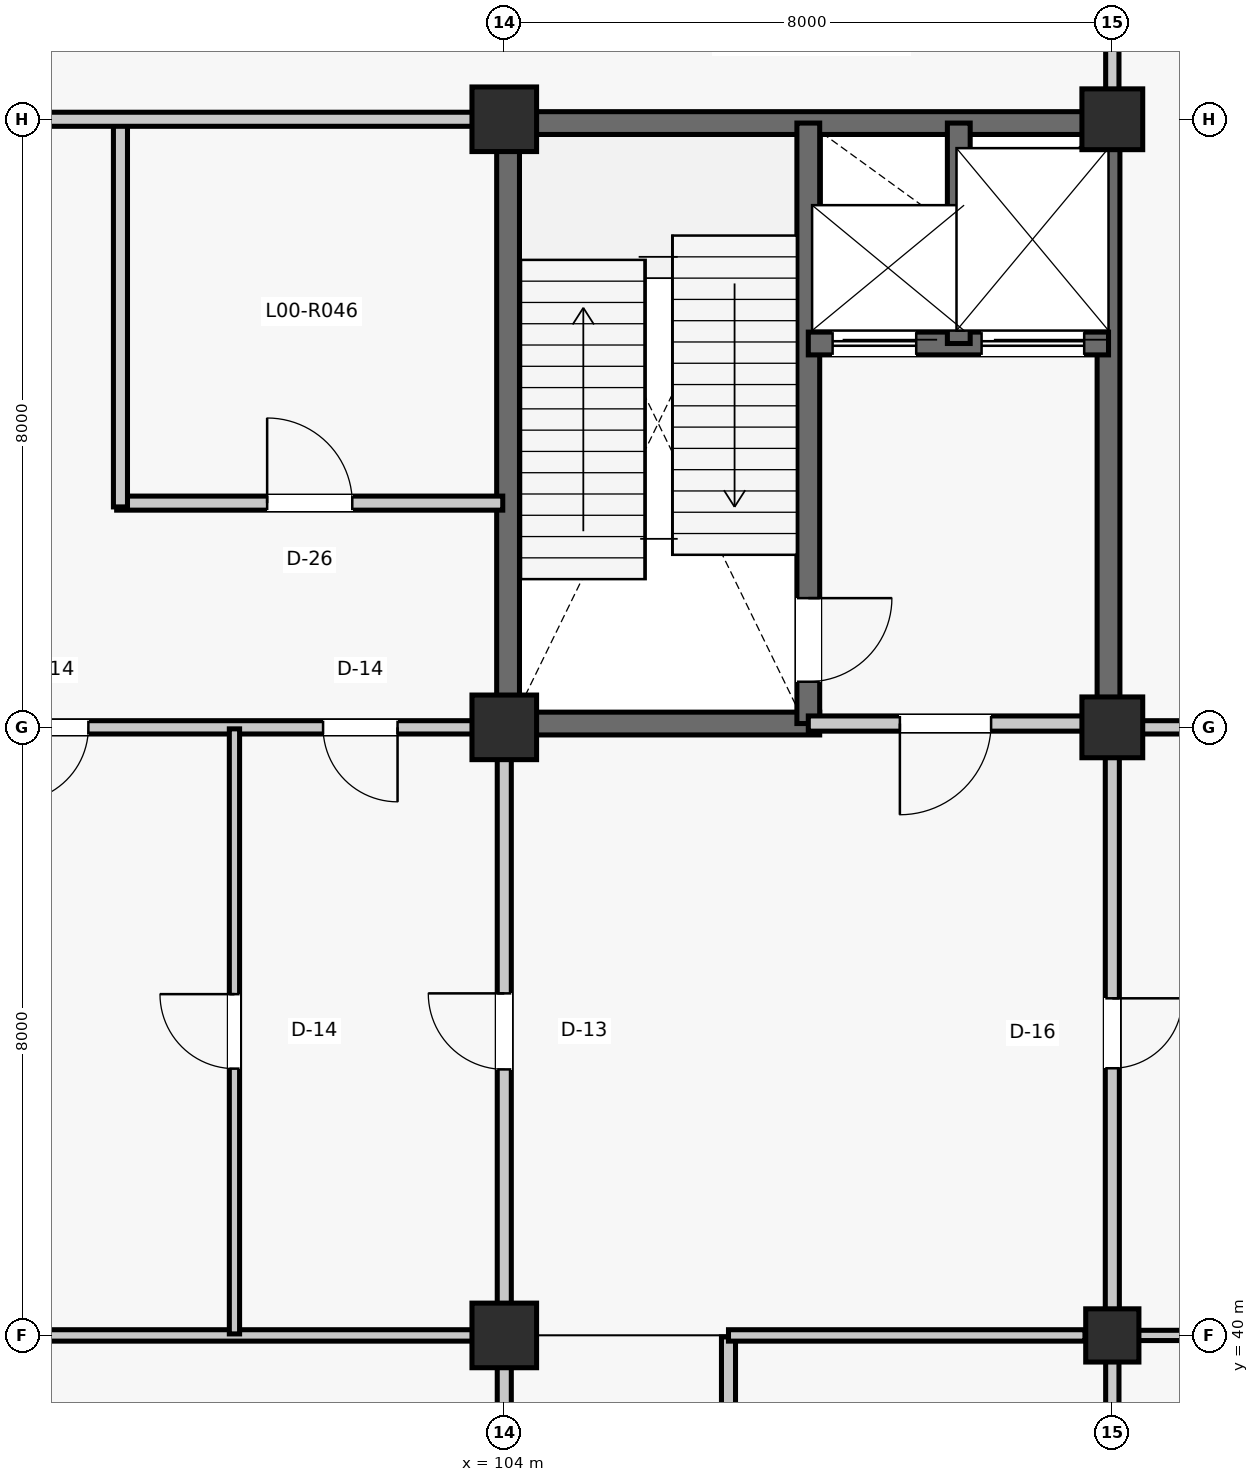
"""IFC4 building model, lengths in metres.
Left out: names, types, materials, properties, quantities, classifications, styles, units other than length and angle.
Written with IfcOpenShell. Run it as: python <this file> out.ifc"""

import sys

from ifc_helpers import new_model, si_unit, direction, frame, frame_2d, origin, origin_2d, place, context, subcontext, project, spatial, rectangle, extrude, element, fill, save


model = new_model("IFC4")
c1 = context("Model", 3, precision=1e-05, world=origin(), true_north=direction((0.0, 1.0)))
c2 = subcontext(c1, "Body", "Model", "MODEL_VIEW")
j1 = project(units=[si_unit("LENGTHUNIT", "METRE"), si_unit("PLANEANGLEUNIT", "RADIAN")], contexts=[c1])
p1 = place(None, origin())
s1 = spatial("IfcSite", under=j1, at=p1, CompositionType="ELEMENT")
p2 = place(p1, origin())
s2 = spatial("IfcBuilding", under=s1, at=p2, CompositionType="ELEMENT")
p3 = place(p2, origin())
s3 = spatial("IfcBuildingStorey", under=s2, at=p3, CompositionType="ELEMENT", Elevation=0.0)
for number, where, z_axis, x_axis in (
    (1, (104.0, 40.0, 0.0), (0.0, 0.0, 1.0), (1.0, 0.0, 0.0)),
    (2, (104.0, 48.0, 0.0), (0.0, 0.0, 1.0), (1.0, 0.0, 0.0)),
    (3, (104.0, 56.0, 0.0), (0.0, 0.0, 1.0), (1.0, 0.0, 0.0)),
):
    element("IfcColumn", number, at=place(p3, frame(where, z_axis=z_axis, x_axis=x_axis)), inside=s3, PredefinedType="COLUMN", context=c2, shape_type="SweptSolid", body=[
        extrude(rectangle(XDim=0.85, YDim=0.85, at=origin_2d()), origin(), (0.0, 0.0, 1.0), 5.28),
    ])
p4 = place(p3, frame((112.0, 40.0, 0.0), z_axis=(0.0, 0.0, 1.0), x_axis=(1.0, 0.0, 0.0)))
e4 = element("IfcColumn", 4, at=p4, inside=s3, PredefinedType="COLUMN", context=c2, shape_type="SweptSolid", body=[
    extrude(rectangle(XDim=0.7, YDim=0.7, at=origin_2d()), origin(), (0.0, 0.0, 1.0), 5.28),
])
for number, where, z_axis, x_axis in (
    (5, (112.0, 48.0, 0.0), (0.0, 0.0, 1.0), (1.0, 0.0, 0.0)),
    (6, (112.0, 56.0, 0.0), (0.0, 0.0, 1.0), (1.0, 0.0, 0.0)),
):
    element("IfcColumn", number, at=place(p3, frame(where, z_axis=z_axis, x_axis=x_axis)), inside=s3, PredefinedType="COLUMN", context=c2, shape_type="SweptSolid", body=[
        extrude(rectangle(XDim=0.8, YDim=0.8, at=origin_2d()), origin(), (0.0, 0.0, 1.0), 5.28),
    ])
p5 = place(p3, frame((104.05, 48.315, 0.0), z_axis=(0.0, 0.0, 1.0), x_axis=(0.0, 1.0, 0.0)))
e7 = element("IfcWall", 7, at=p5, inside=s3, PredefinedType="SHEAR", context=c2, shape_type="SweptSolid", body=[
    extrude(rectangle(XDim=7.37, YDim=0.3, at=frame_2d((3.685, 0.0))), origin(), (0.0, 0.0, 1.0), 5.035),
])
p6 = place(p3, frame((104.315, 55.95, 0.0), z_axis=(0.0, 0.0, 1.0), x_axis=(1.0, 0.0, 0.0)))
e8 = element("IfcWall", 8, at=p6, inside=s3, PredefinedType="SHEAR", context=c2, shape_type="SweptSolid", body=[
    extrude(rectangle(XDim=7.395, YDim=0.3, at=frame_2d((3.698, 0.0))), origin(), (0.0, 0.0, 1.0), 5.035),
])
p7 = place(p3, frame((111.95, 48.29, 0.0), z_axis=(0.0, 0.0, 1.0), x_axis=(0.0, 1.0, 0.0)))
e9 = element("IfcWall", 9, at=p7, inside=s3, PredefinedType="SHEAR", context=c2, shape_type="SweptSolid", body=[
    extrude(rectangle(XDim=7.42, YDim=0.3, at=frame_2d((3.71, 0.0))), origin(), (0.0, 0.0, 1.0), 5.035),
])
p8 = place(p3, frame((104.315, 48.05, 0.0), z_axis=(0.0, 0.0, 1.0), x_axis=(1.0, 0.0, 0.0)))
e10 = element("IfcWall", 10, at=p8, inside=s3, PredefinedType="SHEAR", context=c2, shape_type="SweptSolid", body=[
    extrude(rectangle(XDim=3.835, YDim=0.3, at=frame_2d((1.917, 0.0))), origin(), (0.0, 0.0, 1.0), 5.035),
])
p9 = place(p3, frame((108.0, 48.05, 0.0), z_axis=(0.0, 0.0, 1.0), x_axis=(0.0, 1.0, 0.0)))
e11 = element("IfcWall", 11, at=p9, inside=s3, PredefinedType="SHEAR", context=c2, shape_type="SweptSolid", body=[
    extrude(rectangle(XDim=7.9, YDim=0.3, at=frame_2d((3.95, 0.0))), origin(), (0.0, 0.0, 1.0), 5.035),
])
p10 = place(p9, frame((0.55, 0.0, 0.0)))
e12 = element("IfcOpeningElement", 12, at=p10, cuts=e11, PredefinedType="OPENING", context=c2, shape_type="SweptSolid", body=[
    extrude(rectangle(XDim=1.1, YDim=2.15, at=frame_2d((0.55, 1.075))), frame((0.0, 0.16, 0.0), z_axis=(0.0, -1.0, 0.0), x_axis=(1.0, 0.0, 0.0)), (0.0, 0.0, 1.0), 0.32),
])
p11 = place(p3, frame((108.0, 53.05, 0.0), z_axis=(0.0, 0.0, 1.0), x_axis=(1.0, 0.0, 0.0)))
e13 = element("IfcWall", 13, at=p11, inside=s3, PredefinedType="SHEAR", context=c2, shape_type="SweptSolid", body=[
    extrude(rectangle(XDim=3.95, YDim=0.3, at=frame_2d((1.975, 0.0))), origin(), (0.0, 0.0, 1.0), 5.035),
])
p12 = place(p11, frame((0.32, 0.0, 0.0)))
e14 = element("IfcOpeningElement", 14, at=p12, cuts=e13, PredefinedType="OPENING", context=c2, shape_type="SweptSolid", body=[
    extrude(rectangle(XDim=1.1, YDim=2.2, at=frame_2d((0.55, 1.1))), frame((0.0, 0.16, 0.0), z_axis=(0.0, -1.0, 0.0), x_axis=(1.0, 0.0, 0.0)), (0.0, 0.0, 1.0), 0.32),
])
p13 = place(p11, frame((2.28, 0.0, 0.0)))
e15 = element("IfcOpeningElement", 15, at=p13, cuts=e13, PredefinedType="OPENING", context=c2, shape_type="SweptSolid", body=[
    extrude(rectangle(XDim=1.35, YDim=2.3, at=frame_2d((0.675, 1.15))), frame((0.0, 0.16, 0.0), z_axis=(0.0, -1.0, 0.0), x_axis=(1.0, 0.0, 0.0)), (0.0, 0.0, 1.0), 0.32),
])
p14 = place(p3, frame((109.98, 53.05, 0.0), z_axis=(0.0, 0.0, 1.0), x_axis=(0.0, 1.0, 0.0)))
e16 = element("IfcWall", 16, at=p14, inside=s3, PredefinedType="SHEAR", context=c2, shape_type="SweptSolid", body=[
    extrude(rectangle(XDim=2.9, YDim=0.3, at=frame_2d((1.45, 0.0))), origin(), (0.0, 0.0, 1.0), 5.035),
])
p15 = place(p3, frame((108.0, 48.05, 0.0), z_axis=(0.0, 0.0, 1.0), x_axis=(1.0, 0.0, 0.0)))
e17 = element("IfcWall", 17, at=p15, inside=s3, PredefinedType="PARTITIONING", context=c2, shape_type="SweptSolid", body=[
    extrude(rectangle(XDim=3.61, YDim=0.2, at=frame_2d((1.805, 0.0))), origin(), (0.0, 0.0, 1.0), 4.404),
])
p16 = place(p15, frame((1.205, 0.0, 0.0)))
e18 = element("IfcOpeningElement", 18, at=p16, cuts=e17, PredefinedType="OPENING", context=c2, shape_type="SweptSolid", body=[
    extrude(rectangle(XDim=1.2, YDim=2.15, at=frame_2d((0.6, 1.075))), frame((0.0, 0.11, 0.0), z_axis=(0.0, -1.0, 0.0), x_axis=(1.0, 0.0, 0.0)), (0.0, 0.0, 1.0), 0.22),
])
p17 = place(p3, frame((98.9, 50.95, 0.0), z_axis=(0.0, 0.0, 1.0), x_axis=(1.0, 0.0, 0.0)))
e19 = element("IfcWall", 19, at=p17, inside=s3, PredefinedType="PARTITIONING", context=c2, shape_type="SweptSolid", body=[
    extrude(rectangle(XDim=5.08, YDim=0.185, at=frame_2d((2.54, 0.0))), origin(), (0.0, 0.0, 1.0), 4.471),
])
p18 = place(p17, frame((1.98, 0.0, 0.0)))
e20 = element("IfcOpeningElement", 20, at=p18, cuts=e19, PredefinedType="OPENING", context=c2, shape_type="SweptSolid", body=[
    extrude(rectangle(XDim=1.12, YDim=2.22, at=frame_2d((0.56, 1.11))), frame((0.0, 0.103, 0.0), z_axis=(0.0, -1.0, 0.0), x_axis=(1.0, 0.0, 0.0)), (0.0, 0.0, 1.0), 0.205),
])
p19 = place(p3, frame((98.95, 50.9, 0.0), z_axis=(0.0, 0.0, 1.0), x_axis=(0.0, 1.0, 0.0)))
e21 = element("IfcWall", 21, at=p19, inside=s3, PredefinedType="PARTITIONING", context=c2, shape_type="SweptSolid", body=[
    extrude(rectangle(XDim=5.08, YDim=0.185, at=frame_2d((2.54, 0.0))), origin(), (0.0, 0.0, 1.0), 4.404),
])
p20 = place(p3, frame((106.95, 34.9, 0.0), z_axis=(0.0, 0.0, 1.0), x_axis=(0.0, 1.0, 0.0)))
e22 = element("IfcWall", 22, at=p20, inside=s3, PredefinedType="PARTITIONING", context=c2, shape_type="SweptSolid", body=[
    extrude(rectangle(XDim=5.08, YDim=0.185, at=frame_2d((2.54, 0.0))), origin(), (0.0, 0.0, 1.0), 4.336),
])
p21 = place(p3, frame((106.95, 40.0, 0.0), z_axis=(0.0, 0.0, 1.0), x_axis=(1.0, 0.0, 0.0)))
e23 = element("IfcWall", 23, at=p21, inside=s3, PredefinedType="PARTITIONING", context=c2, shape_type="SweptSolid", body=[
    extrude(rectangle(XDim=4.69, YDim=0.15, at=frame_2d((2.345, 0.0))), origin(), (0.0, 0.0, 1.0), 4.336),
])
p22 = place(p3, frame((104.0, 32.415, 0.0), z_axis=(0.0, 0.0, 1.0), x_axis=(0.0, 1.0, 0.0)))
e24 = element("IfcWall", 24, at=p22, inside=s3, PredefinedType="PARTITIONING", context=c2, shape_type="SweptSolid", body=[
    extrude(rectangle(XDim=7.17, YDim=0.185, at=frame_2d((3.585, 0.0))), origin(), (0.0, 0.0, 1.0), 4.412),
])
p23 = place(p22, frame((2.935, 0.0, 0.0)))
e25 = element("IfcOpeningElement", 25, at=p23, cuts=e24, PredefinedType="OPENING", context=c2, shape_type="SweptSolid", body=[
    extrude(rectangle(XDim=1.3, YDim=2.2, at=frame_2d((0.65, 1.1))), frame((0.0, 0.103, 0.0), z_axis=(0.0, -1.0, 0.0), x_axis=(1.0, 0.0, 0.0)), (0.0, 0.0, 1.0), 0.205),
])
p24 = place(p3, frame((96.189, 40.0, 0.0), z_axis=(0.0, 0.0, 1.0), x_axis=(1.0, 0.0, 0.0)))
e26 = element("IfcWall", 26, at=p24, inside=s3, PredefinedType="PARTITIONING", context=c2, shape_type="SweptSolid", body=[
    extrude(rectangle(XDim=7.396, YDim=0.15, at=frame_2d((3.698, 0.0))), origin(), (0.0, 0.0, 1.0), 4.403),
])
p25 = place(p3, frame((104.0, 40.415, 0.0), z_axis=(0.0, 0.0, 1.0), x_axis=(0.0, 1.0, 0.0)))
e27 = element("IfcWall", 27, at=p25, inside=s3, PredefinedType="PARTITIONING", context=c2, shape_type="SweptSolid", body=[
    extrude(rectangle(XDim=7.17, YDim=0.185, at=frame_2d((3.585, 0.0))), origin(), (0.0, 0.0, 1.0), 4.404),
])
p26 = place(p25, frame((3.085, 0.0, 0.0)))
e28 = element("IfcOpeningElement", 28, at=p26, cuts=e27, PredefinedType="OPENING", context=c2, shape_type="SweptSolid", body=[
    extrude(rectangle(XDim=1.0, YDim=2.15, at=frame_2d((0.5, 1.075))), frame((0.0, 0.103, 0.0), z_axis=(0.0, -1.0, 0.0), x_axis=(1.0, 0.0, 0.0)), (0.0, 0.0, 1.0), 0.205),
])
p27 = place(p3, frame((96.189, 48.0, 0.0), z_axis=(0.0, 0.0, 1.0), x_axis=(1.0, 0.0, 0.0)))
e29 = element("IfcWall", 29, at=p27, inside=s3, PredefinedType="PARTITIONING", context=c2, shape_type="SweptSolid", body=[
    extrude(rectangle(XDim=7.396, YDim=0.175, at=frame_2d((3.698, 0.0))), origin(), (0.0, 0.0, 1.0), 4.336),
])
p28 = place(p27, frame((1.359, 0.0, 0.0)))
e30 = element("IfcOpeningElement", 30, at=p28, cuts=e29, PredefinedType="OPENING", context=c2, shape_type="SweptSolid", body=[
    extrude(rectangle(XDim=0.98, YDim=2.15, at=frame_2d((0.49, 1.075))), frame((0.0, 0.097, 0.0), z_axis=(0.0, -1.0, 0.0), x_axis=(1.0, 0.0, 0.0)), (0.0, 0.0, 1.0), 0.195),
])
p29 = place(p27, frame((5.427, 0.0, 0.0)))
e31 = element("IfcOpeningElement", 31, at=p29, cuts=e29, PredefinedType="OPENING", context=c2, shape_type="SweptSolid", body=[
    extrude(rectangle(XDim=0.98, YDim=2.15, at=frame_2d((0.49, 1.075))), frame((0.0, 0.097, 0.0), z_axis=(0.0, -1.0, 0.0), x_axis=(1.0, 0.0, 0.0)), (0.0, 0.0, 1.0), 0.195),
])
p30 = place(p3, frame((96.189, 56.0, 0.0), z_axis=(0.0, 0.0, 1.0), x_axis=(1.0, 0.0, 0.0)))
e32 = element("IfcWall", 32, at=p30, inside=s3, PredefinedType="PARTITIONING", context=c2, shape_type="SweptSolid", body=[
    extrude(rectangle(XDim=7.396, YDim=0.185, at=frame_2d((3.698, 0.0))), origin(), (0.0, 0.0, 1.0), 4.404),
])
p31 = place(p30, frame((0.52, 0.0, 0.0)))
e33 = element("IfcOpeningElement", 33, at=p31, cuts=e32, PredefinedType="OPENING", context=c2, shape_type="SweptSolid", body=[
    extrude(rectangle(XDim=0.94, YDim=2.12, at=frame_2d((0.47, 1.06))), frame((0.0, 0.103, 0.0), z_axis=(0.0, -1.0, 0.0), x_axis=(1.0, 0.0, 0.0)), (0.0, 0.0, 1.0), 0.205),
])
p32 = place(p3, frame((112.0, 32.34, 0.0), z_axis=(0.0, 0.0, 1.0), x_axis=(0.0, 1.0, 0.0)))
e34 = element("IfcWall", 34, at=p32, inside=s3, PredefinedType="PARTITIONING", context=c2, shape_type="SweptSolid", body=[
    extrude(rectangle(XDim=7.32, YDim=0.175, at=frame_2d((3.66, 0.0))), origin(), (0.0, 0.0, 1.0), 4.404),
])
p33 = place(p32, frame((0.52, 0.0, 0.0)))
e35 = element("IfcOpeningElement", 35, at=p33, cuts=e34, PredefinedType="OPENING", context=c2, shape_type="SweptSolid", body=[
    extrude(rectangle(XDim=0.94, YDim=2.12, at=frame_2d((0.47, 1.06))), frame((0.0, 0.097, 0.0), z_axis=(0.0, -1.0, 0.0), x_axis=(1.0, 0.0, 0.0)), (0.0, 0.0, 1.0), 0.195),
])
p34 = place(p3, frame((112.0, 40.34, 0.0), z_axis=(0.0, 0.0, 1.0), x_axis=(0.0, 1.0, 0.0)))
e36 = element("IfcWall", 36, at=p34, inside=s3, PredefinedType="PARTITIONING", context=c2, shape_type="SweptSolid", body=[
    extrude(rectangle(XDim=7.27, YDim=0.185, at=frame_2d((3.635, 0.0))), origin(), (0.0, 0.0, 1.0), 4.471),
])
p35 = place(p34, frame((3.175, 0.0, 0.0)))
e37 = element("IfcOpeningElement", 37, at=p35, cuts=e36, PredefinedType="OPENING", context=c2, shape_type="SweptSolid", body=[
    extrude(rectangle(XDim=0.92, YDim=2.1, at=frame_2d((0.46, 1.05))), frame((0.0, 0.103, 0.0), z_axis=(0.0, -1.0, 0.0), x_axis=(1.0, 0.0, 0.0)), (0.0, 0.0, 1.0), 0.205),
])
p36 = place(p3, frame((112.0, 56.39, 0.0), z_axis=(0.0, 0.0, 1.0), x_axis=(0.0, 1.0, 0.0)))
e38 = element("IfcWall", 38, at=p36, inside=s3, PredefinedType="PARTITIONING", context=c2, shape_type="SweptSolid", body=[
    extrude(rectangle(XDim=7.27, YDim=0.175, at=frame_2d((3.635, 0.0))), origin(), (0.0, 0.0, 1.0), 4.412),
])
p37 = place(p36, frame((2.685, 0.0, 0.0)))
e39 = element("IfcOpeningElement", 39, at=p37, cuts=e38, PredefinedType="OPENING", context=c2, shape_type="SweptSolid", body=[
    extrude(rectangle(XDim=1.9, YDim=2.38, at=frame_2d((0.95, 1.19))), frame((0.0, 0.097, 0.0), z_axis=(0.0, -1.0, 0.0), x_axis=(1.0, 0.0, 0.0)), (0.0, 0.0, 1.0), 0.195),
])
p38 = place(p3, frame((112.34, 40.0, 0.0), z_axis=(0.0, 0.0, 1.0), x_axis=(1.0, 0.0, 0.0)))
e40 = element("IfcWall", 40, at=p38, inside=s3, PredefinedType="PARTITIONING", context=c2, shape_type="SweptSolid", body=[
    extrude(rectangle(XDim=7.32, YDim=0.135, at=frame_2d((3.66, 0.0))), origin(), (0.0, 0.0, 1.0), 4.404),
])
p39 = place(p3, frame((112.39, 48.0, 0.0), z_axis=(0.0, 0.0, 1.0), x_axis=(1.0, 0.0, 0.0)))
e41 = element("IfcWall", 41, at=p39, inside=s3, PredefinedType="PARTITIONING", context=c2, shape_type="SweptSolid", body=[
    extrude(rectangle(XDim=7.27, YDim=0.175, at=frame_2d((3.635, 0.0))), origin(), (0.0, 0.0, 1.0), 4.327),
])
p40 = place(p39, frame((1.327, 0.0, 0.0)))
e42 = element("IfcOpeningElement", 42, at=p40, cuts=e41, PredefinedType="OPENING", context=c2, shape_type="SweptSolid", body=[
    extrude(rectangle(XDim=0.98, YDim=2.15, at=frame_2d((0.49, 1.075))), frame((0.0, 0.097, 0.0), z_axis=(0.0, -1.0, 0.0), x_axis=(1.0, 0.0, 0.0)), (0.0, 0.0, 1.0), 0.195),
])
p41 = place(p39, frame((5.326, 0.0, 0.0)))
e43 = element("IfcOpeningElement", 43, at=p41, cuts=e41, PredefinedType="OPENING", context=c2, shape_type="SweptSolid", body=[
    extrude(rectangle(XDim=0.98, YDim=2.15, at=frame_2d((0.49, 1.075))), frame((0.0, 0.097, 0.0), z_axis=(0.0, -1.0, 0.0), x_axis=(1.0, 0.0, 0.0)), (0.0, 0.0, 1.0), 0.195),
])
p42 = place(p3, frame((100.45, 40.02, 0.0), z_axis=(0.0, 0.0, 1.0), x_axis=(0.0, 1.0, 0.0)))
e44 = element("IfcWall", 44, at=p42, inside=s3, PredefinedType="PARTITIONING", context=c2, shape_type="SweptSolid", body=[
    extrude(rectangle(XDim=7.96, YDim=0.135, at=frame_2d((3.98, 0.0))), origin(), (0.0, 0.0, 1.0), 4.336),
])
p43 = place(p42, frame((3.49, 0.0, 0.0)))
e45 = element("IfcOpeningElement", 45, at=p43, cuts=e44, PredefinedType="OPENING", context=c2, shape_type="SweptSolid", body=[
    extrude(rectangle(XDim=0.98, YDim=2.15, at=frame_2d((0.49, 1.075))), frame((0.0, 0.077, 0.0), z_axis=(0.0, -1.0, 0.0), x_axis=(1.0, 0.0, 0.0)), (0.0, 0.0, 1.0), 0.155),
])
p44 = place(p10, frame((1.1, 0.0, 0.0), z_axis=(0.0, 0.0, 1.0), x_axis=(-1.0, 0.0, 0.0)))
e46 = element("IfcDoor", 46, at=p44, inside=s3, OperationType="SINGLE_SWING_RIGHT", PredefinedType="DOOR", context=c2, shape_type="SweptSolid", body=[
    extrude(rectangle(XDim=1.1, YDim=2.15, at=frame_2d((0.55, 1.075))), frame((0.0, 0.025, 0.0), z_axis=(0.0, -1.0, 0.0), x_axis=(1.0, 0.0, 0.0)), (0.0, 0.0, 1.0), 0.05),
])
fill(e12, e46)
p45 = place(p12, origin())
e47 = element("IfcDoor", 47, at=p45, inside=s3, OperationType="SLIDING_TO_LEFT", PredefinedType="DOOR", context=c2, shape_type="SweptSolid", body=[
    extrude(rectangle(XDim=1.1, YDim=2.2, at=frame_2d((0.55, 1.1))), frame((0.0, 0.025, 0.0), z_axis=(0.0, -1.0, 0.0), x_axis=(1.0, 0.0, 0.0)), (0.0, 0.0, 1.0), 0.05),
])
fill(e14, e47)
p46 = place(p13, origin())
e48 = element("IfcDoor", 48, at=p46, inside=s3, OperationType="DOUBLE_DOOR_SLIDING", PredefinedType="DOOR", context=c2, shape_type="SweptSolid", body=[
    extrude(rectangle(XDim=1.35, YDim=2.3, at=frame_2d((0.675, 1.15))), frame((0.0, 0.025, 0.0), z_axis=(0.0, -1.0, 0.0), x_axis=(1.0, 0.0, 0.0)), (0.0, 0.0, 1.0), 0.05),
])
fill(e15, e48)
p47 = place(p16, frame((1.2, 0.0, 0.0), z_axis=(0.0, 0.0, 1.0), x_axis=(-1.0, 0.0, 0.0)))
e49 = element("IfcDoor", 49, at=p47, inside=s3, OperationType="SINGLE_SWING_LEFT", PredefinedType="DOOR", context=c2, shape_type="SweptSolid", body=[
    extrude(rectangle(XDim=1.2, YDim=2.15, at=frame_2d((0.6, 1.075))), frame((0.0, 0.025, 0.0), z_axis=(0.0, -1.0, 0.0), x_axis=(1.0, 0.0, 0.0)), (0.0, 0.0, 1.0), 0.05),
])
fill(e18, e49)
p48 = place(p18, origin())
e50 = element("IfcDoor", 50, at=p48, inside=s3, OperationType="SINGLE_SWING_LEFT", PredefinedType="DOOR", context=c2, shape_type="SweptSolid", body=[
    extrude(rectangle(XDim=1.12, YDim=2.22, at=frame_2d((0.56, 1.11))), frame((0.0, 0.025, 0.0), z_axis=(0.0, -1.0, 0.0), x_axis=(1.0, 0.0, 0.0)), (0.0, 0.0, 1.0), 0.05),
])
fill(e20, e50)
p49 = place(p26, origin())
e51 = element("IfcDoor", 51, at=p49, inside=s3, OperationType="SINGLE_SWING_RIGHT", PredefinedType="DOOR", context=c2, shape_type="SweptSolid", body=[
    extrude(rectangle(XDim=1.0, YDim=2.15, at=frame_2d((0.5, 1.075))), frame((0.0, 0.025, 0.0), z_axis=(0.0, -1.0, 0.0), x_axis=(1.0, 0.0, 0.0)), (0.0, 0.0, 1.0), 0.05),
])
fill(e28, e51)
p50 = place(p28, frame((0.98, 0.0, 0.0), z_axis=(0.0, 0.0, 1.0), x_axis=(-1.0, 0.0, 0.0)))
e52 = element("IfcDoor", 52, at=p50, inside=s3, OperationType="SINGLE_SWING_LEFT", PredefinedType="DOOR", context=c2, shape_type="SweptSolid", body=[
    extrude(rectangle(XDim=0.98, YDim=2.15, at=frame_2d((0.49, 1.075))), frame((0.0, 0.025, 0.0), z_axis=(0.0, -1.0, 0.0), x_axis=(1.0, 0.0, 0.0)), (0.0, 0.0, 1.0), 0.05),
])
fill(e30, e52)
p51 = place(p29, frame((0.98, 0.0, 0.0), z_axis=(0.0, 0.0, 1.0), x_axis=(-1.0, 0.0, 0.0)))
e53 = element("IfcDoor", 53, at=p51, inside=s3, OperationType="SINGLE_SWING_RIGHT", PredefinedType="DOOR", context=c2, shape_type="SweptSolid", body=[
    extrude(rectangle(XDim=0.98, YDim=2.15, at=frame_2d((0.49, 1.075))), frame((0.0, 0.025, 0.0), z_axis=(0.0, -1.0, 0.0), x_axis=(1.0, 0.0, 0.0)), (0.0, 0.0, 1.0), 0.05),
])
fill(e31, e53)
p52 = place(p35, frame((0.92, 0.0, 0.0), z_axis=(0.0, 0.0, 1.0), x_axis=(-1.0, 0.0, 0.0)))
e54 = element("IfcDoor", 54, at=p52, inside=s3, OperationType="SINGLE_SWING_RIGHT", PredefinedType="DOOR", context=c2, shape_type="SweptSolid", body=[
    extrude(rectangle(XDim=0.92, YDim=2.1, at=frame_2d((0.46, 1.05))), frame((0.0, 0.025, 0.0), z_axis=(0.0, -1.0, 0.0), x_axis=(1.0, 0.0, 0.0)), (0.0, 0.0, 1.0), 0.05),
])
fill(e37, e54)
p53 = place(p43, origin())
e55 = element("IfcDoor", 55, at=p53, inside=s3, OperationType="SINGLE_SWING_RIGHT", PredefinedType="DOOR", context=c2, shape_type="SweptSolid", body=[
    extrude(rectangle(XDim=0.98, YDim=2.15, at=frame_2d((0.49, 1.075))), frame((0.0, 0.025, 0.0), z_axis=(0.0, -1.0, 0.0), x_axis=(1.0, 0.0, 0.0)), (0.0, 0.0, 1.0), 0.05),
])
fill(e45, e55)
save(model, sys.argv[1])
